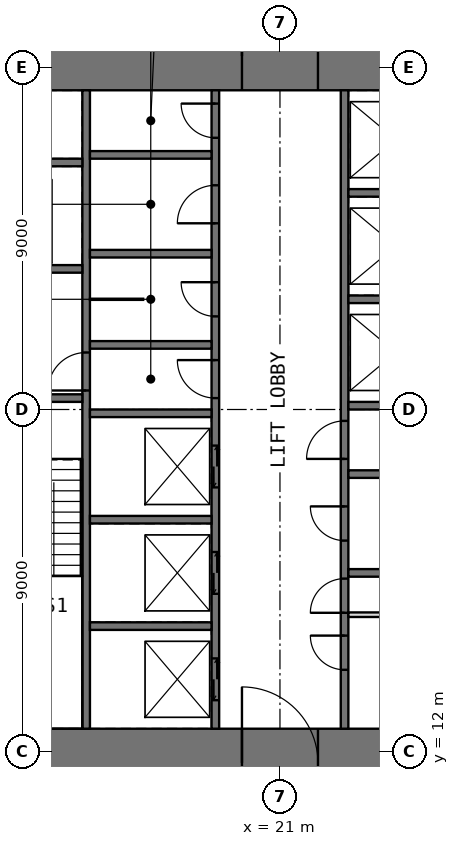
"""IFC4 building model, lengths in metres.
Left out: names, types, materials, properties, quantities, classifications, styles, units other than length and angle.
Written with IfcOpenShell. Run it as: python <this file> out.ifc"""

import sys

from ifc_helpers import new_model, si_unit, direction, frame, frame_2d, origin, place, context, subcontext, project, spatial, rectangle, extrude, element, fill, save


model = new_model("IFC4")
c1 = context("Model", 3, precision=1e-05, world=origin(), true_north=direction((0.0, 1.0)))
c2 = subcontext(c1, "Body", "Model", "MODEL_VIEW")
j1 = project(units=[si_unit("LENGTHUNIT", "METRE"), si_unit("PLANEANGLEUNIT", "RADIAN")], contexts=[c1])
p1 = place(None, origin())
s1 = spatial("IfcSite", under=j1, at=p1, CompositionType="ELEMENT")
p2 = place(p1, origin())
s2 = spatial("IfcBuilding", under=s1, at=p2, CompositionType="ELEMENT")
p3 = place(p2, frame((0.0, 0.0, 70.5)))
s3 = spatial("IfcBuildingStorey", under=s2, at=p3, CompositionType="ELEMENT", Elevation=70.5)
p4 = place(p3, frame((10.8, 11.7, -0.05), z_axis=(0.0, 0.0, 1.0), x_axis=(1.0, 0.0, 0.0)))
e1 = element("IfcWall", 1, at=p4, inside=s3, PredefinedType="SHEAR", context=c2, shape_type="SweptSolid", body=[
    extrude(rectangle(XDim=20.4, YDim=1.8, at=frame_2d((10.2, 0.0))), origin(), (0.0, 0.0, 1.0), 4.0),
])
p5 = place(p4, frame((9.2, 0.0, 0.05)))
e2 = element("IfcOpeningElement", 2, at=p5, cuts=e1, PredefinedType="OPENING", context=c2, shape_type="SweptSolid", body=[
    extrude(rectangle(XDim=2.0, YDim=2.2, at=frame_2d((1.0, 1.1))), frame((0.0, 0.91, 0.0), z_axis=(0.0, -1.0, 0.0), x_axis=(1.0, 0.0, 0.0)), (0.0, 0.0, 1.0), 1.82),
])
p6 = place(p3, frame((10.8, 30.3, -0.05), z_axis=(0.0, 0.0, 1.0), x_axis=(1.0, 0.0, 0.0)))
e3 = element("IfcWall", 3, at=p6, inside=s3, PredefinedType="SHEAR", context=c2, shape_type="SweptSolid", body=[
    extrude(rectangle(XDim=20.4, YDim=1.8, at=frame_2d((10.2, 0.0))), origin(), (0.0, 0.0, 1.0), 4.0),
])
p7 = place(p6, frame((9.2, 0.0, 0.05)))
e4 = element("IfcOpeningElement", 4, at=p7, cuts=e3, PredefinedType="OPENING", context=c2, shape_type="SweptSolid", body=[
    extrude(rectangle(XDim=2.0, YDim=2.2, at=frame_2d((1.0, 1.1))), frame((0.0, 0.91, 0.0), z_axis=(0.0, -1.0, 0.0), x_axis=(1.0, 0.0, 0.0)), (0.0, 0.0, 1.0), 1.82),
])
p8 = place(p3, frame((15.9, 12.6, -0.05), z_axis=(0.0, 0.0, 1.0), x_axis=(0.0, 1.0, 0.0)))
e5 = element("IfcWall", 5, at=p8, inside=s3, PredefinedType="SHEAR", context=c2, shape_type="SweptSolid", body=[
    extrude(rectangle(XDim=16.8, YDim=0.2, at=frame_2d((8.4, 0.0))), origin(), (0.0, 0.0, 1.0), 4.0),
])
p9 = place(p8, frame((8.9, 0.0, 0.05)))
e6 = element("IfcOpeningElement", 6, at=p9, cuts=e5, PredefinedType="OPENING", context=c2, shape_type="SweptSolid", body=[
    extrude(rectangle(XDim=1.0, YDim=2.2, at=frame_2d((0.5, 1.1))), frame((0.0, 0.11, 0.0), z_axis=(0.0, -1.0, 0.0), x_axis=(1.0, 0.0, 0.0)), (0.0, 0.0, 1.0), 0.22),
])
p10 = place(p3, frame((19.3, 12.6, -0.05), z_axis=(0.0, 0.0, 1.0), x_axis=(0.0, 1.0, 0.0)))
e7 = element("IfcWall", 7, at=p10, inside=s3, PredefinedType="SHEAR", context=c2, shape_type="SweptSolid", body=[
    extrude(rectangle(XDim=16.8, YDim=0.2, at=frame_2d((8.4, 0.0))), origin(), (0.0, 0.0, 1.0), 4.0),
])
p11 = place(p10, frame((8.7, 0.0, 0.05)))
e8 = element("IfcOpeningElement", 8, at=p11, cuts=e7, PredefinedType="OPENING", context=c2, shape_type="SweptSolid", body=[
    extrude(rectangle(XDim=1.0, YDim=2.2, at=frame_2d((0.5, 1.1))), frame((0.0, 0.11, 0.0), z_axis=(0.0, -1.0, 0.0), x_axis=(1.0, 0.0, 0.0)), (0.0, 0.0, 1.0), 0.22),
])
p12 = place(p10, frame((10.85, 0.0, 0.05)))
e9 = element("IfcOpeningElement", 9, at=p12, cuts=e7, PredefinedType="OPENING", context=c2, shape_type="SweptSolid", body=[
    extrude(rectangle(XDim=0.9, YDim=2.2, at=frame_2d((0.45, 1.1))), frame((0.0, 0.11, 0.0), z_axis=(0.0, -1.0, 0.0), x_axis=(1.0, 0.0, 0.0)), (0.0, 0.0, 1.0), 0.22),
])
p13 = place(p10, frame((13.3, 0.0, 0.05)))
e10 = element("IfcOpeningElement", 10, at=p13, cuts=e7, PredefinedType="OPENING", context=c2, shape_type="SweptSolid", body=[
    extrude(rectangle(XDim=1.0, YDim=2.2, at=frame_2d((0.5, 1.1))), frame((0.0, 0.11, 0.0), z_axis=(0.0, -1.0, 0.0), x_axis=(1.0, 0.0, 0.0)), (0.0, 0.0, 1.0), 0.22),
])
p14 = place(p10, frame((15.55, 0.0, 0.05)))
e11 = element("IfcOpeningElement", 11, at=p14, cuts=e7, PredefinedType="OPENING", context=c2, shape_type="SweptSolid", body=[
    extrude(rectangle(XDim=0.9, YDim=2.2, at=frame_2d((0.45, 1.1))), frame((0.0, 0.11, 0.0), z_axis=(0.0, -1.0, 0.0), x_axis=(1.0, 0.0, 0.0)), (0.0, 0.0, 1.0), 0.22),
])
p15 = place(p10, frame((0.75, 0.0, 0.05)))
e12 = element("IfcOpeningElement", 12, at=p15, cuts=e7, PredefinedType="OPENING", context=c2, shape_type="SweptSolid", body=[
    extrude(rectangle(XDim=1.1, YDim=2.2, at=frame_2d((0.55, 1.1))), frame((0.0, 0.11, 0.0), z_axis=(0.0, -1.0, 0.0), x_axis=(1.0, 0.0, 0.0)), (0.0, 0.0, 1.0), 0.22),
])
p16 = place(p10, frame((3.55, 0.0, 0.05)))
e13 = element("IfcOpeningElement", 13, at=p16, cuts=e7, PredefinedType="OPENING", context=c2, shape_type="SweptSolid", body=[
    extrude(rectangle(XDim=1.1, YDim=2.2, at=frame_2d((0.55, 1.1))), frame((0.0, 0.11, 0.0), z_axis=(0.0, -1.0, 0.0), x_axis=(1.0, 0.0, 0.0)), (0.0, 0.0, 1.0), 0.22),
])
p17 = place(p10, frame((6.35, 0.0, 0.05)))
e14 = element("IfcOpeningElement", 14, at=p17, cuts=e7, PredefinedType="OPENING", context=c2, shape_type="SweptSolid", body=[
    extrude(rectangle(XDim=1.1, YDim=2.2, at=frame_2d((0.55, 1.1))), frame((0.0, 0.11, 0.0), z_axis=(0.0, -1.0, 0.0), x_axis=(1.0, 0.0, 0.0)), (0.0, 0.0, 1.0), 0.22),
])
p18 = place(p3, frame((22.7, 12.6, -0.05), z_axis=(0.0, 0.0, 1.0), x_axis=(0.0, 1.0, 0.0)))
e15 = element("IfcWall", 15, at=p18, inside=s3, PredefinedType="SHEAR", context=c2, shape_type="SweptSolid", body=[
    extrude(rectangle(XDim=16.8, YDim=0.2, at=frame_2d((8.4, 0.0))), origin(), (0.0, 0.0, 1.0), 4.0),
])
p19 = place(p18, frame((3.05, 0.0, 0.05)))
e16 = element("IfcOpeningElement", 16, at=p19, cuts=e15, PredefinedType="OPENING", context=c2, shape_type="SweptSolid", body=[
    extrude(rectangle(XDim=0.9, YDim=2.2, at=frame_2d((0.45, 1.1))), frame((0.0, 0.11, 0.0), z_axis=(0.0, -1.0, 0.0), x_axis=(1.0, 0.0, 0.0)), (0.0, 0.0, 1.0), 0.22),
])
p20 = place(p18, frame((7.1, 0.0, 0.05)))
e17 = element("IfcOpeningElement", 17, at=p20, cuts=e15, PredefinedType="OPENING", context=c2, shape_type="SweptSolid", body=[
    extrude(rectangle(XDim=1.0, YDim=2.2, at=frame_2d((0.5, 1.1))), frame((0.0, 0.11, 0.0), z_axis=(0.0, -1.0, 0.0), x_axis=(1.0, 0.0, 0.0)), (0.0, 0.0, 1.0), 0.22),
])
p21 = place(p18, frame((1.55, 0.0, 0.05)))
e18 = element("IfcOpeningElement", 18, at=p21, cuts=e15, PredefinedType="OPENING", context=c2, shape_type="SweptSolid", body=[
    extrude(rectangle(XDim=0.9, YDim=2.2, at=frame_2d((0.45, 1.1))), frame((0.0, 0.11, 0.0), z_axis=(0.0, -1.0, 0.0), x_axis=(1.0, 0.0, 0.0)), (0.0, 0.0, 1.0), 0.22),
])
p22 = place(p18, frame((4.95, 0.0, 0.05)))
e19 = element("IfcOpeningElement", 19, at=p22, cuts=e15, PredefinedType="OPENING", context=c2, shape_type="SweptSolid", body=[
    extrude(rectangle(XDim=0.9, YDim=2.2, at=frame_2d((0.45, 1.1))), frame((0.0, 0.11, 0.0), z_axis=(0.0, -1.0, 0.0), x_axis=(1.0, 0.0, 0.0)), (0.0, 0.0, 1.0), 0.22),
])
p23 = place(p3, frame((12.6, 21.3, -0.05), z_axis=(0.0, 0.0, 1.0), x_axis=(1.0, 0.0, 0.0)))
e20 = element("IfcWall", 20, at=p23, inside=s3, PredefinedType="SHEAR", context=c2, shape_type="SweptSolid", body=[
    extrude(rectangle(XDim=3.2, YDim=0.2, at=frame_2d((1.6, 0.0))), origin(), (0.0, 0.0, 1.0), 4.0),
])
p24 = place(p23, frame((1.1, 0.0, 0.05)))
e21 = element("IfcOpeningElement", 21, at=p24, cuts=e20, PredefinedType="OPENING", context=c2, shape_type="SweptSolid", body=[
    extrude(rectangle(XDim=1.0, YDim=2.2, at=frame_2d((0.5, 1.1))), frame((0.0, 0.11, 0.0), z_axis=(0.0, -1.0, 0.0), x_axis=(1.0, 0.0, 0.0)), (0.0, 0.0, 1.0), 0.22),
])
p25 = place(p3, frame((12.6, 24.7, -0.05), z_axis=(0.0, 0.0, 1.0), x_axis=(1.0, 0.0, 0.0)))
e22 = element("IfcWall", 22, at=p25, inside=s3, PredefinedType="SHEAR", context=c2, shape_type="SweptSolid", body=[
    extrude(rectangle(XDim=3.2, YDim=0.2, at=frame_2d((1.6, 0.0))), origin(), (0.0, 0.0, 1.0), 4.0),
])
p26 = place(p25, frame((1.0, 0.0, 0.05)))
e23 = element("IfcOpeningElement", 23, at=p26, cuts=e22, PredefinedType="OPENING", context=c2, shape_type="SweptSolid", body=[
    extrude(rectangle(XDim=1.2, YDim=2.2, at=frame_2d((0.6, 1.1))), frame((0.0, 0.11, 0.0), z_axis=(0.0, -1.0, 0.0), x_axis=(1.0, 0.0, 0.0)), (0.0, 0.0, 1.0), 0.22),
])
for number, where, z_axis, x_axis in (
    (24, (12.6, 27.5, -0.05), (0.0, 0.0, 1.0), (1.0, 0.0, 0.0)),
    (25, (16.0, 15.3, -0.05), (0.0, 0.0, 1.0), (1.0, 0.0, 0.0)),
    (26, (16.0, 18.1, -0.05), (0.0, 0.0, 1.0), (1.0, 0.0, 0.0)),
    (27, (16.0, 20.9, -0.05), (0.0, 0.0, 1.0), (1.0, 0.0, 0.0)),
    (28, (16.0, 22.7, -0.05), (0.0, 0.0, 1.0), (1.0, 0.0, 0.0)),
    (29, (16.0, 25.1, -0.05), (0.0, 0.0, 1.0), (1.0, 0.0, 0.0)),
    (30, (16.0, 27.7, -0.05), (0.0, 0.0, 1.0), (1.0, 0.0, 0.0)),
    (31, (22.8, 16.7, -0.05), (0.0, 0.0, 1.0), (1.0, 0.0, 0.0)),
    (32, (22.8, 19.3, -0.05), (0.0, 0.0, 1.0), (1.0, 0.0, 0.0)),
    (33, (22.8, 21.1, -0.05), (0.0, 0.0, 1.0), (1.0, 0.0, 0.0)),
    (34, (22.8, 23.9, -0.05), (0.0, 0.0, 1.0), (1.0, 0.0, 0.0)),
    (35, (22.8, 26.7, -0.05), (0.0, 0.0, 1.0), (1.0, 0.0, 0.0)),
):
    element("IfcWall", number, at=place(p3, frame(where, z_axis=z_axis, x_axis=x_axis)), inside=s3, PredefinedType="SHEAR", context=c2, shape_type="SweptSolid", body=[
        extrude(rectangle(XDim=3.2, YDim=0.2, at=frame_2d((1.6, 0.0))), origin(), (0.0, 0.0, 1.0), 4.0),
    ])
p27 = place(p3, frame((22.8, 15.6, 0.0), z_axis=(0.0, 0.0, 1.0), x_axis=(1.0, 0.0, 0.0)))
e36 = element("IfcWall", 36, at=p27, inside=s3, PredefinedType="PARTITIONING", context=c2, shape_type="SweptSolid", body=[
    extrude(rectangle(XDim=3.2, YDim=0.12, at=frame_2d((1.6, 0.0))), origin(), (0.0, 0.0, 1.0), 3.75),
])
p28 = place(p3, frame((16.0, 23.9, 0.0), z_axis=(0.0, 0.0, 1.0), x_axis=(1.0, 0.0, 0.0)))
e37 = element("IfcWall", 37, at=p28, inside=s3, PredefinedType="PARTITIONING", context=c2, shape_type="SweptSolid", body=[
    extrude(rectangle(XDim=1.4, YDim=0.03, at=frame_2d((0.7, 0.0))), origin(), (0.0, 0.0, 1.0), 3.75),
])
p29 = place(p5, origin())
e38 = element("IfcDoor", 38, at=p29, inside=s3, OperationType="DOUBLE_DOOR_SINGLE_SWING", PredefinedType="DOOR", context=c2, shape_type="SweptSolid", body=[
    extrude(rectangle(XDim=2.0, YDim=2.2, at=frame_2d((1.0, 1.1))), frame((0.0, 0.025, 0.0), z_axis=(0.0, -1.0, 0.0), x_axis=(1.0, 0.0, 0.0)), (0.0, 0.0, 1.0), 0.05),
])
fill(e2, e38)
p30 = place(p7, origin())
e39 = element("IfcDoor", 39, at=p30, inside=s3, OperationType="DOUBLE_DOOR_SINGLE_SWING", PredefinedType="DOOR", context=c2, shape_type="SweptSolid", body=[
    extrude(rectangle(XDim=2.0, YDim=2.2, at=frame_2d((1.0, 1.1))), frame((0.0, 0.025, 0.0), z_axis=(0.0, -1.0, 0.0), x_axis=(1.0, 0.0, 0.0)), (0.0, 0.0, 1.0), 0.05),
])
fill(e4, e39)
p31 = place(p19, origin())
e40 = element("IfcDoor", 40, at=p31, inside=s3, OperationType="SINGLE_SWING_LEFT", PredefinedType="DOOR", context=c2, shape_type="SweptSolid", body=[
    extrude(rectangle(XDim=0.9, YDim=2.2, at=frame_2d((0.45, 1.1))), frame((0.0, 0.025, 0.0), z_axis=(0.0, -1.0, 0.0), x_axis=(1.0, 0.0, 0.0)), (0.0, 0.0, 1.0), 0.05),
])
fill(e16, e40)
p32 = place(p9, origin())
e41 = element("IfcDoor", 41, at=p32, inside=s3, OperationType="SINGLE_SWING_LEFT", PredefinedType="DOOR", context=c2, shape_type="SweptSolid", body=[
    extrude(rectangle(XDim=1.0, YDim=2.2, at=frame_2d((0.5, 1.1))), frame((0.0, 0.025, 0.0), z_axis=(0.0, -1.0, 0.0), x_axis=(1.0, 0.0, 0.0)), (0.0, 0.0, 1.0), 0.05),
])
fill(e6, e41)
p33 = place(p11, origin())
e42 = element("IfcDoor", 42, at=p33, inside=s3, OperationType="SINGLE_SWING_RIGHT", PredefinedType="DOOR", context=c2, shape_type="SweptSolid", body=[
    extrude(rectangle(XDim=1.0, YDim=2.2, at=frame_2d((0.5, 1.1))), frame((0.0, 0.025, 0.0), z_axis=(0.0, -1.0, 0.0), x_axis=(1.0, 0.0, 0.0)), (0.0, 0.0, 1.0), 0.05),
])
fill(e8, e42)
p34 = place(p20, origin())
e43 = element("IfcDoor", 43, at=p34, inside=s3, OperationType="SINGLE_SWING_LEFT", PredefinedType="DOOR", context=c2, shape_type="SweptSolid", body=[
    extrude(rectangle(XDim=1.0, YDim=2.2, at=frame_2d((0.5, 1.1))), frame((0.0, 0.025, 0.0), z_axis=(0.0, -1.0, 0.0), x_axis=(1.0, 0.0, 0.0)), (0.0, 0.0, 1.0), 0.05),
])
fill(e17, e43)
p35 = place(p12, origin())
e44 = element("IfcDoor", 44, at=p35, inside=s3, OperationType="SINGLE_SWING_RIGHT", PredefinedType="DOOR", context=c2, shape_type="SweptSolid", body=[
    extrude(rectangle(XDim=0.9, YDim=2.2, at=frame_2d((0.45, 1.1))), frame((0.0, 0.025, 0.0), z_axis=(0.0, -1.0, 0.0), x_axis=(1.0, 0.0, 0.0)), (0.0, 0.0, 1.0), 0.05),
])
fill(e9, e44)
p36 = place(p13, origin())
e45 = element("IfcDoor", 45, at=p36, inside=s3, OperationType="SINGLE_SWING_LEFT", PredefinedType="DOOR", context=c2, shape_type="SweptSolid", body=[
    extrude(rectangle(XDim=1.0, YDim=2.2, at=frame_2d((0.5, 1.1))), frame((0.0, 0.025, 0.0), z_axis=(0.0, -1.0, 0.0), x_axis=(1.0, 0.0, 0.0)), (0.0, 0.0, 1.0), 0.05),
])
fill(e10, e45)
p37 = place(p14, origin())
e46 = element("IfcDoor", 46, at=p37, inside=s3, OperationType="SINGLE_SWING_RIGHT", PredefinedType="DOOR", context=c2, shape_type="SweptSolid", body=[
    extrude(rectangle(XDim=0.9, YDim=2.2, at=frame_2d((0.45, 1.1))), frame((0.0, 0.025, 0.0), z_axis=(0.0, -1.0, 0.0), x_axis=(1.0, 0.0, 0.0)), (0.0, 0.0, 1.0), 0.05),
])
fill(e11, e46)
p38 = place(p21, origin())
e47 = element("IfcDoor", 47, at=p38, inside=s3, OperationType="SINGLE_SWING_RIGHT", PredefinedType="DOOR", context=c2, shape_type="SweptSolid", body=[
    extrude(rectangle(XDim=0.9, YDim=2.2, at=frame_2d((0.45, 1.1))), frame((0.0, 0.025, 0.0), z_axis=(0.0, -1.0, 0.0), x_axis=(1.0, 0.0, 0.0)), (0.0, 0.0, 1.0), 0.05),
])
fill(e18, e47)
p39 = place(p22, origin())
e48 = element("IfcDoor", 48, at=p39, inside=s3, OperationType="SINGLE_SWING_RIGHT", PredefinedType="DOOR", context=c2, shape_type="SweptSolid", body=[
    extrude(rectangle(XDim=0.9, YDim=2.2, at=frame_2d((0.45, 1.1))), frame((0.0, 0.025, 0.0), z_axis=(0.0, -1.0, 0.0), x_axis=(1.0, 0.0, 0.0)), (0.0, 0.0, 1.0), 0.05),
])
fill(e19, e48)
p40 = place(p15, origin())
e49 = element("IfcDoor", 49, at=p40, inside=s3, OperationType="DOUBLE_DOOR_SLIDING", PredefinedType="DOOR", context=c2, shape_type="SweptSolid", body=[
    extrude(rectangle(XDim=1.1, YDim=2.2, at=frame_2d((0.55, 1.1))), frame((0.0, 0.025, 0.0), z_axis=(0.0, -1.0, 0.0), x_axis=(1.0, 0.0, 0.0)), (0.0, 0.0, 1.0), 0.05),
])
fill(e12, e49)
p41 = place(p16, origin())
e50 = element("IfcDoor", 50, at=p41, inside=s3, OperationType="DOUBLE_DOOR_SLIDING", PredefinedType="DOOR", context=c2, shape_type="SweptSolid", body=[
    extrude(rectangle(XDim=1.1, YDim=2.2, at=frame_2d((0.55, 1.1))), frame((0.0, 0.025, 0.0), z_axis=(0.0, -1.0, 0.0), x_axis=(1.0, 0.0, 0.0)), (0.0, 0.0, 1.0), 0.05),
])
fill(e13, e50)
p42 = place(p17, origin())
e51 = element("IfcDoor", 51, at=p42, inside=s3, OperationType="DOUBLE_DOOR_SLIDING", PredefinedType="DOOR", context=c2, shape_type="SweptSolid", body=[
    extrude(rectangle(XDim=1.1, YDim=2.2, at=frame_2d((0.55, 1.1))), frame((0.0, 0.025, 0.0), z_axis=(0.0, -1.0, 0.0), x_axis=(1.0, 0.0, 0.0)), (0.0, 0.0, 1.0), 0.05),
])
fill(e14, e51)
save(model, sys.argv[1])
